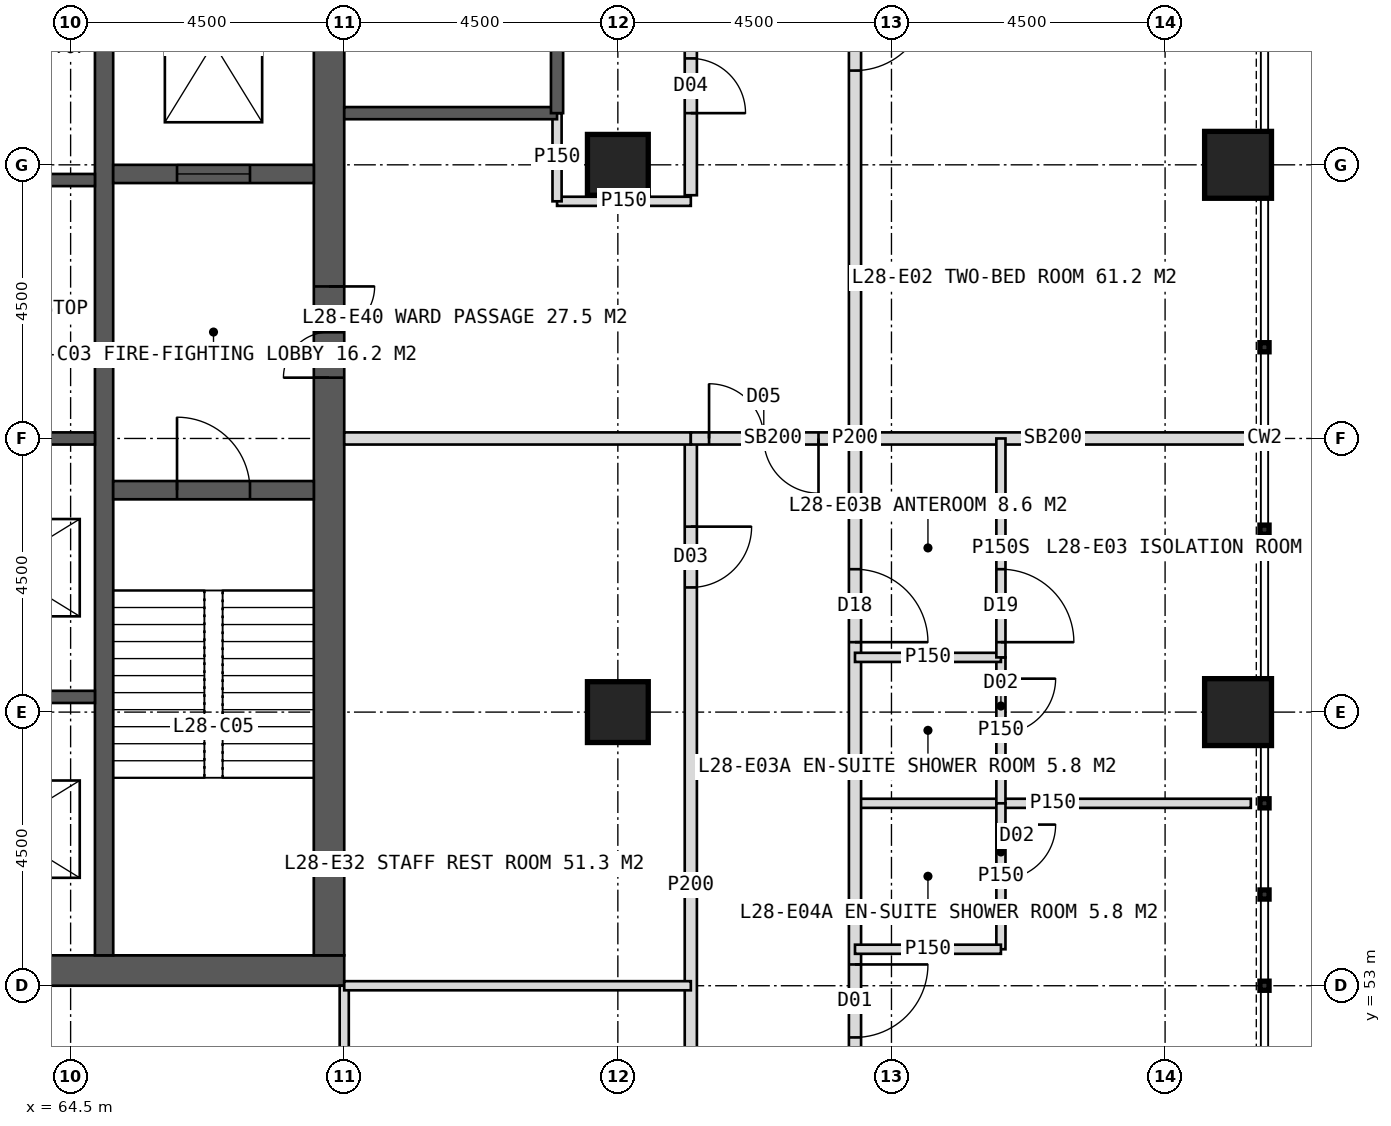
"""IFC4 building model, lengths in metres.
Left out: names, types, materials, properties, quantities, classifications, styles, units other than length and angle.
Written with IfcOpenShell. Run it as: python <this file> out.ifc"""

import sys

from ifc_helpers import new_model, si_unit, direction, frame, frame_2d, origin, origin_2d, place, context, subcontext, project, spatial, rectangle, hollow_rectangle, extrude, element, fill, save


model = new_model("IFC4")
c1 = context("Model", 3, precision=1e-05, world=origin(), true_north=direction((0.0, 1.0)))
c2 = subcontext(c1, "Body", "Model", "MODEL_VIEW")
j1 = project(units=[si_unit("LENGTHUNIT", "METRE"), si_unit("PLANEANGLEUNIT", "RADIAN")], contexts=[c1])
p1 = place(None, origin())
s1 = spatial("IfcSite", under=j1, at=p1, CompositionType="ELEMENT")
p2 = place(p1, origin())
s2 = spatial("IfcBuilding", under=s1, at=p2, CompositionType="ELEMENT")
p3 = place(p2, frame((0.0, 0.0, 120.0)))
s3 = spatial("IfcBuildingStorey", under=s2, at=p3, CompositionType="ELEMENT", Elevation=120.0)
p4 = place(p3, frame((51.0, 53.25, 0.0), z_axis=(0.0, 0.0, 1.0), x_axis=(1.0, 0.0, 0.0)))
e1 = element("IfcWall", 1, at=p4, inside=s3, PredefinedType="SHEAR", context=c2, shape_type="SweptSolid", body=[
    extrude(rectangle(XDim=18.0, YDim=0.5, at=frame_2d((9.0, 0.0))), origin(), (0.0, 0.0, 1.0), 4.0),
])
p5 = place(p4, frame((8.1, 0.0, 0.0)))
e2 = element("IfcOpeningElement", 2, at=p5, cuts=e1, PredefinedType="OPENING", context=c2, shape_type="SweptSolid", body=[
    extrude(rectangle(XDim=1.8, YDim=2.2, at=frame_2d((0.9, 1.1))), frame((0.0, 0.26, 0.0), z_axis=(0.0, -1.0, 0.0), x_axis=(1.0, 0.0, 0.0)), (0.0, 0.0, 1.0), 0.52),
])
p6 = place(p3, frame((68.75, 53.5, 0.0), z_axis=(0.0, 0.0, 1.0), x_axis=(0.0, 1.0, 0.0)))
e3 = element("IfcWall", 3, at=p6, inside=s3, PredefinedType="SHEAR", context=c2, shape_type="SweptSolid", body=[
    extrude(rectangle(XDim=17.0, YDim=0.5, at=frame_2d((8.5, 0.0))), origin(), (0.0, 0.0, 1.0), 4.0),
])
p7 = place(p6, frame((9.5, 0.0, 0.0)))
e4 = element("IfcOpeningElement", 4, at=p7, cuts=e3, PredefinedType="OPENING", context=c2, shape_type="SweptSolid", body=[
    extrude(rectangle(XDim=1.5, YDim=2.2, at=frame_2d((0.75, 1.1))), frame((0.0, 0.26, 0.0), z_axis=(0.0, -1.0, 0.0), x_axis=(1.0, 0.0, 0.0)), (0.0, 0.0, 1.0), 0.52),
])
p8 = place(p3, frame((65.05, 53.5, 0.0), z_axis=(0.0, 0.0, 1.0), x_axis=(0.0, 1.0, 0.0)))
e5 = element("IfcWall", 5, at=p8, inside=s3, PredefinedType="SHEAR", context=c2, shape_type="SweptSolid", body=[
    extrude(rectangle(XDim=17.0, YDim=0.3, at=frame_2d((8.5, 0.0))), origin(), (0.0, 0.0, 1.0), 4.0),
])
for number, where, z_axis, x_axis in (
    (6, (61.85, 57.75, 0.0), (0.0, 0.0, 1.0), (1.0, 0.0, 0.0)),
    (7, (61.85, 62.0, 0.0), (0.0, 0.0, 1.0), (1.0, 0.0, 0.0)),
    (8, (61.85, 66.25, 0.0), (0.0, 0.0, 1.0), (1.0, 0.0, 0.0)),
):
    element("IfcWall", number, at=place(p3, frame(where, z_axis=z_axis, x_axis=x_axis)), inside=s3, PredefinedType="SHEAR", context=c2, shape_type="SweptSolid", body=[
        extrude(rectangle(XDim=3.05, YDim=0.2, at=frame_2d((1.525, 0.0))), origin(), (0.0, 0.0, 1.0), 4.0),
    ])
p9 = place(p3, frame((65.2, 61.15, 0.0), z_axis=(0.0, 0.0, 1.0), x_axis=(1.0, 0.0, 0.0)))
e9 = element("IfcWall", 9, at=p9, inside=s3, PredefinedType="SHEAR", context=c2, shape_type="SweptSolid", body=[
    extrude(rectangle(XDim=3.3, YDim=0.3, at=frame_2d((1.65, 0.0))), origin(), (0.0, 0.0, 1.0), 4.0),
])
p10 = place(p9, frame((1.05, 0.0, 0.0)))
e10 = element("IfcOpeningElement", 10, at=p10, cuts=e9, PredefinedType="OPENING", context=c2, shape_type="SweptSolid", body=[
    extrude(rectangle(XDim=1.2, YDim=2.1, at=frame_2d((0.6, 1.05))), frame((0.0, 0.16, 0.0), z_axis=(0.0, -1.0, 0.0), x_axis=(1.0, 0.0, 0.0)), (0.0, 0.0, 1.0), 0.32),
])
p11 = place(p3, frame((65.2, 66.35, 0.0), z_axis=(0.0, 0.0, 1.0), x_axis=(1.0, 0.0, 0.0)))
e11 = element("IfcWall", 11, at=p11, inside=s3, PredefinedType="SHEAR", context=c2, shape_type="SweptSolid", body=[
    extrude(rectangle(XDim=3.3, YDim=0.3, at=frame_2d((1.65, 0.0))), origin(), (0.0, 0.0, 1.0), 4.0),
])
p12 = place(p11, frame((1.05, 0.0, 0.0)))
e12 = element("IfcOpeningElement", 12, at=p12, cuts=e11, PredefinedType="OPENING", context=c2, shape_type="SweptSolid", body=[
    extrude(rectangle(XDim=1.2, YDim=2.2, at=frame_2d((0.6, 1.1))), frame((0.0, 0.16, 0.0), z_axis=(0.0, -1.0, 0.0), x_axis=(1.0, 0.0, 0.0)), (0.0, 0.0, 1.0), 0.32),
])
for number, where, z_axis, x_axis in (
    (13, (73.5, 57.5, 0.0), (0.0, 0.0, 1.0), (1.0, 0.0, 0.0)),
    (14, (73.5, 66.5, 0.0), (0.0, 0.0, 1.0), (1.0, 0.0, 0.0)),
):
    element("IfcColumn", number, at=place(p3, frame(where, z_axis=z_axis, x_axis=x_axis)), inside=s3, PredefinedType="COLUMN", context=c2, shape_type="SweptSolid", body=[
        extrude(hollow_rectangle(XDim=1.0, YDim=1.0, WallThickness=0.1, at=origin_2d()), origin(), (0.0, 0.0, 1.0), 4.0),
    ])
for number, where, z_axis, x_axis in (
    (15, (83.7, 57.5, 0.0), (0.0, 0.0, 1.0), (1.0, 0.0, 0.0)),
    (16, (83.7, 66.5, 0.0), (0.0, 0.0, 1.0), (1.0, 0.0, 0.0)),
):
    element("IfcColumn", number, at=place(p3, frame(where, z_axis=z_axis, x_axis=x_axis)), inside=s3, PredefinedType="COLUMN", context=c2, shape_type="SweptSolid", body=[
        extrude(hollow_rectangle(XDim=1.1, YDim=1.1, WallThickness=0.1, at=origin_2d()), origin(), (0.0, 0.0, 1.0), 4.0),
    ])
p13 = place(p3, frame((69.0, 53.0, 0.0), z_axis=(0.0, 0.0, 1.0), x_axis=(0.0, -1.0, 0.0)))
e17 = element("IfcWall", 17, at=p13, inside=s3, PredefinedType="PARTITIONING", context=c2, shape_type="SweptSolid", body=[
    extrude(rectangle(XDim=5.7, YDim=0.15, at=frame_2d((2.85, 0.0))), origin(), (0.0, 0.0, 1.0), 3.75),
])
p14 = place(p3, frame((77.4, 62.0, 0.0), z_axis=(0.0, 0.0, 1.0), x_axis=(1.0, 0.0, 0.0)))
e18 = element("IfcWall", 18, at=p14, inside=s3, PredefinedType="SOLIDWALL", context=c2, shape_type="SweptSolid", body=[
    extrude(rectangle(XDim=6.51, YDim=0.2, at=frame_2d((3.255, 0.0))), origin(), (0.0, 0.0, 1.0), 2.95),
])
p15 = place(p3, frame((77.4, 56.0, 0.0), z_axis=(0.0, 0.0, 1.0), x_axis=(1.0, 0.0, 0.0)))
e19 = element("IfcWall", 19, at=p15, inside=s3, PredefinedType="PARTITIONING", context=c2, shape_type="SweptSolid", body=[
    extrude(rectangle(XDim=6.51, YDim=0.15, at=frame_2d((3.255, 0.0))), origin(), (0.0, 0.0, 1.0), 3.75),
])
p16 = place(p3, frame((77.4, 79.4, 0.0), z_axis=(0.0, 0.0, 1.0), x_axis=(0.0, -1.0, 0.0)))
e20 = element("IfcWall", 20, at=p16, inside=s3, PredefinedType="PARTITIONING", context=c2, shape_type="SweptSolid", body=[
    extrude(rectangle(XDim=34.8, YDim=0.2, at=frame_2d((17.4, 0.0))), origin(), (0.0, 0.0, 1.0), 3.75),
])
p17 = place(p16, frame((2.45, 0.0, 0.0)))
e21 = element("IfcOpeningElement", 21, at=p17, cuts=e20, PredefinedType="OPENING", context=c2, shape_type="SweptSolid", body=[
    extrude(rectangle(XDim=1.2, YDim=2.2, at=frame_2d((0.6, 1.1))), frame((0.0, 0.11, 0.0), z_axis=(0.0, -1.0, 0.0), x_axis=(1.0, 0.0, 0.0)), (0.0, 0.0, 1.0), 0.22),
])
p18 = place(p16, frame((10.15, 0.0, 0.0)))
e22 = element("IfcOpeningElement", 22, at=p18, cuts=e20, PredefinedType="OPENING", context=c2, shape_type="SweptSolid", body=[
    extrude(rectangle(XDim=1.2, YDim=2.2, at=frame_2d((0.6, 1.1))), frame((0.0, 0.11, 0.0), z_axis=(0.0, -1.0, 0.0), x_axis=(1.0, 0.0, 0.0)), (0.0, 0.0, 1.0), 0.22),
])
p19 = place(p16, frame((19.55, 0.0, 0.0)))
e23 = element("IfcOpeningElement", 23, at=p19, cuts=e20, PredefinedType="OPENING", context=c2, shape_type="SweptSolid", body=[
    extrude(rectangle(XDim=1.2, YDim=2.2, at=frame_2d((0.6, 1.1))), frame((0.0, 0.11, 0.0), z_axis=(0.0, -1.0, 0.0), x_axis=(1.0, 0.0, 0.0)), (0.0, 0.0, 1.0), 0.22),
])
p20 = place(p16, frame((26.05, 0.0, 0.0)))
e24 = element("IfcOpeningElement", 24, at=p20, cuts=e20, PredefinedType="OPENING", context=c2, shape_type="SweptSolid", body=[
    extrude(rectangle(XDim=1.2, YDim=2.2, at=frame_2d((0.6, 1.1))), frame((0.0, 0.11, 0.0), z_axis=(0.0, -1.0, 0.0), x_axis=(1.0, 0.0, 0.0)), (0.0, 0.0, 1.0), 0.22),
])
p21 = place(p3, frame((79.8, 58.4, 0.0), z_axis=(0.0, 0.0, 1.0), x_axis=(0.0, -1.0, 0.0)))
e25 = element("IfcWall", 25, at=p21, inside=s3, PredefinedType="PARTITIONING", context=c2, shape_type="SweptSolid", body=[
    extrude(rectangle(XDim=2.4, YDim=0.15, at=frame_2d((1.2, 0.0))), origin(), (0.0, 0.0, 1.0), 3.75),
])
p22 = place(p21, frame((0.35, 0.0, 0.0)))
e26 = element("IfcOpeningElement", 26, at=p22, cuts=e25, PredefinedType="OPENING", context=c2, shape_type="SweptSolid", body=[
    extrude(rectangle(XDim=0.9, YDim=2.1, at=frame_2d((0.45, 1.05))), frame((0.0, 0.085, 0.0), z_axis=(0.0, -1.0, 0.0), x_axis=(1.0, 0.0, 0.0)), (0.0, 0.0, 1.0), 0.17),
])
p23 = place(p3, frame((77.4, 58.4, 0.0), z_axis=(0.0, 0.0, 1.0), x_axis=(1.0, 0.0, 0.0)))
e27 = element("IfcWall", 27, at=p23, inside=s3, PredefinedType="PARTITIONING", context=c2, shape_type="SweptSolid", body=[
    extrude(rectangle(XDim=2.4, YDim=0.15, at=frame_2d((1.2, 0.0))), origin(), (0.0, 0.0, 1.0), 3.75),
])
p24 = place(p3, frame((79.8, 62.0, 0.0), z_axis=(0.0, 0.0, 1.0), x_axis=(0.0, -1.0, 0.0)))
e28 = element("IfcWall", 28, at=p24, inside=s3, PredefinedType="PARTITIONING", context=c2, shape_type="SweptSolid", body=[
    extrude(rectangle(XDim=3.6, YDim=0.15, at=frame_2d((1.8, 0.0))), origin(), (0.0, 0.0, 1.0), 3.75),
])
p25 = place(p24, frame((2.15, 0.0, 0.0)))
e29 = element("IfcOpeningElement", 29, at=p25, cuts=e28, PredefinedType="OPENING", context=c2, shape_type="SweptSolid", body=[
    extrude(rectangle(XDim=1.2, YDim=2.2, at=frame_2d((0.6, 1.1))), frame((0.0, 0.085, 0.0), z_axis=(0.0, -1.0, 0.0), x_axis=(1.0, 0.0, 0.0)), (0.0, 0.0, 1.0), 0.17),
])
p26 = place(p3, frame((79.8, 56.0, 0.0), z_axis=(0.0, 0.0, 1.0), x_axis=(0.0, -1.0, 0.0)))
e30 = element("IfcWall", 30, at=p26, inside=s3, PredefinedType="PARTITIONING", context=c2, shape_type="SweptSolid", body=[
    extrude(rectangle(XDim=2.4, YDim=0.15, at=frame_2d((1.2, 0.0))), origin(), (0.0, 0.0, 1.0), 3.75),
])
p27 = place(p26, frame((0.35, 0.0, 0.0)))
e31 = element("IfcOpeningElement", 31, at=p27, cuts=e30, PredefinedType="OPENING", context=c2, shape_type="SweptSolid", body=[
    extrude(rectangle(XDim=0.9, YDim=2.1, at=frame_2d((0.45, 1.05))), frame((0.0, 0.085, 0.0), z_axis=(0.0, -1.0, 0.0), x_axis=(1.0, 0.0, 0.0)), (0.0, 0.0, 1.0), 0.17),
])
p28 = place(p3, frame((77.4, 53.6, 0.0), z_axis=(0.0, 0.0, 1.0), x_axis=(1.0, 0.0, 0.0)))
e32 = element("IfcWall", 32, at=p28, inside=s3, PredefinedType="PARTITIONING", context=c2, shape_type="SweptSolid", body=[
    extrude(rectangle(XDim=2.4, YDim=0.15, at=frame_2d((1.2, 0.0))), origin(), (0.0, 0.0, 1.0), 3.75),
])
p29 = place(p3, frame((74.7, 76.7, 0.0), z_axis=(0.0, 0.0, 1.0), x_axis=(0.0, -1.0, 0.0)))
e33 = element("IfcWall", 33, at=p29, inside=s3, PredefinedType="PARTITIONING", context=c2, shape_type="SweptSolid", body=[
    extrude(rectangle(XDim=10.7, YDim=0.2, at=frame_2d((5.35, 0.0))), origin(), (0.0, 0.0, 1.0), 3.75),
])
p30 = place(p29, frame((1.6, 0.0, 0.0)))
e34 = element("IfcOpeningElement", 34, at=p30, cuts=e33, PredefinedType="OPENING", context=c2, shape_type="SweptSolid", body=[
    extrude(rectangle(XDim=1.0, YDim=2.1, at=frame_2d((0.5, 1.05))), frame((0.0, 0.11, 0.0), z_axis=(0.0, -1.0, 0.0), x_axis=(1.0, 0.0, 0.0)), (0.0, 0.0, 1.0), 0.22),
])
p31 = place(p29, frame((8.45, 0.0, 0.0)))
e35 = element("IfcOpeningElement", 35, at=p31, cuts=e33, PredefinedType="OPENING", context=c2, shape_type="SweptSolid", body=[
    extrude(rectangle(XDim=0.9, YDim=2.1, at=frame_2d((0.45, 1.05))), frame((0.0, 0.11, 0.0), z_axis=(0.0, -1.0, 0.0), x_axis=(1.0, 0.0, 0.0)), (0.0, 0.0, 1.0), 0.22),
])
p32 = place(p3, frame((74.7, 62.0, 0.0), z_axis=(0.0, 0.0, 1.0), x_axis=(0.0, -1.0, 0.0)))
e36 = element("IfcWall", 36, at=p32, inside=s3, PredefinedType="PARTITIONING", context=c2, shape_type="SweptSolid", body=[
    extrude(rectangle(XDim=14.7, YDim=0.2, at=frame_2d((7.35, 0.0))), origin(), (0.0, 0.0, 1.0), 3.75),
])
p33 = place(p32, frame((1.45, 0.0, 0.0)))
e37 = element("IfcOpeningElement", 37, at=p33, cuts=e36, PredefinedType="OPENING", context=c2, shape_type="SweptSolid", body=[
    extrude(rectangle(XDim=1.0, YDim=2.1, at=frame_2d((0.5, 1.05))), frame((0.0, 0.11, 0.0), z_axis=(0.0, -1.0, 0.0), x_axis=(1.0, 0.0, 0.0)), (0.0, 0.0, 1.0), 0.22),
])
p34 = place(p32, frame((11.35, 0.0, 0.0)))
e38 = element("IfcOpeningElement", 38, at=p34, cuts=e36, PredefinedType="OPENING", context=c2, shape_type="SweptSolid", body=[
    extrude(rectangle(XDim=1.0, YDim=2.1, at=frame_2d((0.5, 1.05))), frame((0.0, 0.11, 0.0), z_axis=(0.0, -1.0, 0.0), x_axis=(1.0, 0.0, 0.0)), (0.0, 0.0, 1.0), 0.22),
])
p35 = place(p3, frame((72.5, 65.9, 0.0), z_axis=(0.0, 0.0, 1.0), x_axis=(1.0, 0.0, 0.0)))
e39 = element("IfcWall", 39, at=p35, inside=s3, PredefinedType="PARTITIONING", context=c2, shape_type="SweptSolid", body=[
    extrude(rectangle(XDim=2.2, YDim=0.15, at=frame_2d((1.1, 0.0))), origin(), (0.0, 0.0, 1.0), 3.75),
])
p36 = place(p3, frame((69.0, 62.0, 0.0), z_axis=(0.0, 0.0, 1.0), x_axis=(1.0, 0.0, 0.0)))
e40 = element("IfcWall", 40, at=p36, inside=s3, PredefinedType="SOLIDWALL", context=c2, shape_type="SweptSolid", body=[
    extrude(rectangle(XDim=5.7, YDim=0.2, at=frame_2d((2.85, 0.0))), origin(), (0.0, 0.0, 1.0), 2.95),
])
p37 = place(p3, frame((69.0, 53.0, 0.0), z_axis=(0.0, 0.0, 1.0), x_axis=(1.0, 0.0, 0.0)))
e41 = element("IfcWall", 41, at=p37, inside=s3, PredefinedType="PARTITIONING", context=c2, shape_type="SweptSolid", body=[
    extrude(rectangle(XDim=5.7, YDim=0.15, at=frame_2d((2.85, 0.0))), origin(), (0.0, 0.0, 1.0), 3.75),
])
p38 = place(p3, frame((74.7, 62.0, 0.0), z_axis=(0.0, 0.0, 1.0), x_axis=(1.0, 0.0, 0.0)))
e42 = element("IfcWall", 42, at=p38, inside=s3, PredefinedType="SOLIDWALL", context=c2, shape_type="SweptSolid", body=[
    extrude(rectangle(XDim=2.7, YDim=0.2, at=frame_2d((1.35, 0.0))), origin(), (0.0, 0.0, 1.0), 2.95),
])
p39 = place(p38, frame((0.3, 0.0, 0.0)))
e43 = element("IfcOpeningElement", 43, at=p39, cuts=e42, PredefinedType="OPENING", context=c2, shape_type="SweptSolid", body=[
    extrude(rectangle(XDim=1.8, YDim=2.2, at=frame_2d((0.9, 1.1))), frame((0.0, 0.11, 0.0), z_axis=(0.0, -1.0, 0.0), x_axis=(1.0, 0.0, 0.0)), (0.0, 0.0, 1.0), 0.22),
])
p40 = place(p3, frame((72.5, 65.9, 0.0), z_axis=(0.0, 0.0, 1.0), x_axis=(0.0, 1.0, 0.0)))
e44 = element("IfcWall", 44, at=p40, inside=s3, PredefinedType="PARTITIONING", context=c2, shape_type="SweptSolid", body=[
    extrude(rectangle(XDim=1.45, YDim=0.15, at=frame_2d((0.725, 0.0))), origin(), (0.0, 0.0, 1.0), 3.75),
])
p41 = place(p3, frame((69.0, 67.35, 0.0), z_axis=(0.0, 0.0, 1.0), x_axis=(1.0, 0.0, 0.0)))
e45 = element("IfcWall", 45, at=p41, inside=s3, PredefinedType="SOLIDWALL", context=c2, shape_type="SweptSolid", body=[
    extrude(rectangle(XDim=3.5, YDim=0.2, at=frame_2d((1.75, 0.0))), origin(), (0.0, 0.0, 1.0), 3.75),
])
p42 = place(p3, frame((72.5, 67.35, 0.0), z_axis=(0.0, 0.0, 1.0), x_axis=(0.0, 1.0, 0.0)))
e46 = element("IfcWall", 46, at=p42, inside=s3, PredefinedType="SOLIDWALL", context=c2, shape_type="SweptSolid", body=[
    extrude(rectangle(XDim=7.75, YDim=0.2, at=frame_2d((3.875, 0.0))), origin(), (0.0, 0.0, 1.0), 3.75),
])
p43 = place(p18, origin())
e47 = element("IfcDoor", 47, at=p43, inside=s3, OperationType="SINGLE_SWING_LEFT", PredefinedType="DOOR", context=c2, shape_type="SweptSolid", body=[
    extrude(rectangle(XDim=1.2, YDim=2.2, at=frame_2d((0.6, 1.1))), frame((0.0, 0.025, 0.0), z_axis=(0.0, -1.0, 0.0), x_axis=(1.0, 0.0, 0.0)), (0.0, 0.0, 1.0), 0.05),
])
fill(e22, e47)
p44 = place(p25, origin())
e48 = element("IfcDoor", 48, at=p44, inside=s3, OperationType="SINGLE_SWING_RIGHT", PredefinedType="DOOR", context=c2, shape_type="SweptSolid", body=[
    extrude(rectangle(XDim=1.2, YDim=2.2, at=frame_2d((0.6, 1.1))), frame((0.0, 0.025, 0.0), z_axis=(0.0, -1.0, 0.0), x_axis=(1.0, 0.0, 0.0)), (0.0, 0.0, 1.0), 0.05),
])
fill(e29, e48)
p45 = place(p19, origin())
e49 = element("IfcDoor", 49, at=p45, inside=s3, OperationType="SINGLE_SWING_RIGHT", PredefinedType="DOOR", context=c2, shape_type="SweptSolid", body=[
    extrude(rectangle(XDim=1.2, YDim=2.2, at=frame_2d((0.6, 1.1))), frame((0.0, 0.025, 0.0), z_axis=(0.0, -1.0, 0.0), x_axis=(1.0, 0.0, 0.0)), (0.0, 0.0, 1.0), 0.05),
])
fill(e23, e49)
p46 = place(p22, origin())
e50 = element("IfcDoor", 50, at=p46, inside=s3, OperationType="SINGLE_SWING_LEFT", PredefinedType="DOOR", context=c2, shape_type="SweptSolid", body=[
    extrude(rectangle(XDim=0.9, YDim=2.1, at=frame_2d((0.45, 1.05))), frame((0.0, 0.025, 0.0), z_axis=(0.0, -1.0, 0.0), x_axis=(1.0, 0.0, 0.0)), (0.0, 0.0, 1.0), 0.05),
])
fill(e26, e50)
p47 = place(p20, origin())
e51 = element("IfcDoor", 51, at=p47, inside=s3, OperationType="SINGLE_SWING_LEFT", PredefinedType="DOOR", context=c2, shape_type="SweptSolid", body=[
    extrude(rectangle(XDim=1.2, YDim=2.2, at=frame_2d((0.6, 1.1))), frame((0.0, 0.025, 0.0), z_axis=(0.0, -1.0, 0.0), x_axis=(1.0, 0.0, 0.0)), (0.0, 0.0, 1.0), 0.05),
])
fill(e24, e51)
p48 = place(p27, origin())
e52 = element("IfcDoor", 52, at=p48, inside=s3, OperationType="SINGLE_SWING_LEFT", PredefinedType="DOOR", context=c2, shape_type="SweptSolid", body=[
    extrude(rectangle(XDim=0.9, YDim=2.1, at=frame_2d((0.45, 1.05))), frame((0.0, 0.025, 0.0), z_axis=(0.0, -1.0, 0.0), x_axis=(1.0, 0.0, 0.0)), (0.0, 0.0, 1.0), 0.05),
])
fill(e31, e52)
p49 = place(p31, origin())
e53 = element("IfcDoor", 53, at=p49, inside=s3, OperationType="SINGLE_SWING_RIGHT", PredefinedType="DOOR", context=c2, shape_type="SweptSolid", body=[
    extrude(rectangle(XDim=0.9, YDim=2.1, at=frame_2d((0.45, 1.05))), frame((0.0, 0.025, 0.0), z_axis=(0.0, -1.0, 0.0), x_axis=(1.0, 0.0, 0.0)), (0.0, 0.0, 1.0), 0.05),
])
fill(e35, e53)
p50 = place(p33, origin())
e54 = element("IfcDoor", 54, at=p50, inside=s3, OperationType="SINGLE_SWING_LEFT", PredefinedType="DOOR", context=c2, shape_type="SweptSolid", body=[
    extrude(rectangle(XDim=1.0, YDim=2.1, at=frame_2d((0.5, 1.05))), frame((0.0, 0.025, 0.0), z_axis=(0.0, -1.0, 0.0), x_axis=(1.0, 0.0, 0.0)), (0.0, 0.0, 1.0), 0.05),
])
fill(e37, e54)
p51 = place(p39, origin())
e55 = element("IfcDoor", 55, at=p51, inside=s3, OperationType="DOUBLE_DOOR_DOUBLE_SWING", PredefinedType="DOOR", context=c2, shape_type="SweptSolid", body=[
    extrude(rectangle(XDim=1.8, YDim=2.2, at=frame_2d((0.9, 1.1))), frame((0.0, 0.025, 0.0), z_axis=(0.0, -1.0, 0.0), x_axis=(1.0, 0.0, 0.0)), (0.0, 0.0, 1.0), 0.05),
])
fill(e43, e55)
p52 = place(p7, origin())
e56 = element("IfcDoor", 56, at=p52, inside=s3, OperationType="DOUBLE_DOOR_SINGLE_SWING", PredefinedType="DOOR", context=c2, shape_type="SweptSolid", body=[
    extrude(rectangle(XDim=1.5, YDim=2.2, at=frame_2d((0.75, 1.1))), frame((0.0, 0.025, 0.0), z_axis=(0.0, -1.0, 0.0), x_axis=(1.0, 0.0, 0.0)), (0.0, 0.0, 1.0), 0.05),
])
fill(e4, e56)
p53 = place(p10, origin())
e57 = element("IfcDoor", 57, at=p53, inside=s3, OperationType="SINGLE_SWING_LEFT", PredefinedType="DOOR", context=c2, shape_type="SweptSolid", body=[
    extrude(rectangle(XDim=1.2, YDim=2.1, at=frame_2d((0.6, 1.05))), frame((0.0, 0.025, 0.0), z_axis=(0.0, -1.0, 0.0), x_axis=(1.0, 0.0, 0.0)), (0.0, 0.0, 1.0), 0.05),
])
fill(e10, e57)
p54 = place(p12, origin())
e58 = element("IfcDoor", 58, at=p54, inside=s3, OperationType="SLIDING_TO_LEFT", PredefinedType="DOOR", context=c2, shape_type="SweptSolid", body=[
    extrude(rectangle(XDim=1.2, YDim=2.2, at=frame_2d((0.6, 1.1))), frame((0.0, 0.025, 0.0), z_axis=(0.0, -1.0, 0.0), x_axis=(1.0, 0.0, 0.0)), (0.0, 0.0, 1.0), 0.05),
])
fill(e12, e58)
save(model, sys.argv[1])
